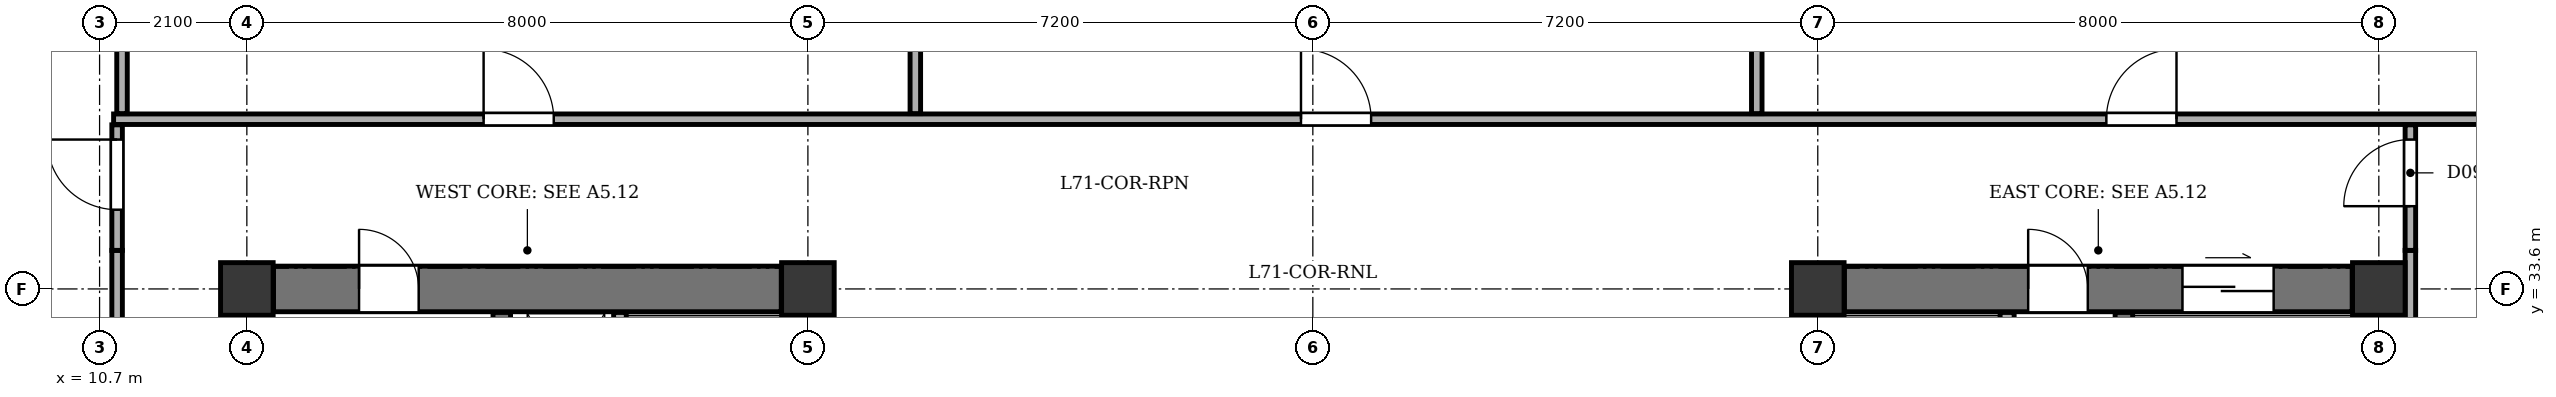
"""IFC4 building model, lengths in metres.
Left out: names, types, materials, properties, quantities, classifications, styles, units other than length and angle.
Written with IfcOpenShell. Run it as: python <this file> out.ifc"""

import sys

from ifc_helpers import new_model, si_unit, direction, frame, frame_2d, origin, origin_2d, place, context, subcontext, project, spatial, rectangle, extrude, element, fill, save


model = new_model("IFC4")
c1 = context("Model", 3, precision=1e-05, world=origin(), true_north=direction((0.0, 1.0)))
c2 = subcontext(c1, "Body", "Model", "MODEL_VIEW")
j1 = project(units=[si_unit("LENGTHUNIT", "METRE"), si_unit("PLANEANGLEUNIT", "RADIAN")], contexts=[c1])
p1 = place(None, origin())
s1 = spatial("IfcSite", under=j1, at=p1, CompositionType="ELEMENT")
p2 = place(p1, origin())
s2 = spatial("IfcBuilding", under=s1, at=p2, CompositionType="ELEMENT")
p3 = place(p2, frame((0.0, 0.0, 268.7)))
s3 = spatial("IfcBuildingStorey", under=s2, at=p3, CompositionType="ELEMENT", Elevation=268.7)
for number, where, z_axis, x_axis in (
    (1, (12.8, 33.6, 0.0), (0.0, 0.0, 1.0), (1.0, 0.0, 0.0)),
    (2, (20.8, 33.6, 0.0), (0.0, 0.0, 1.0), (1.0, 0.0, 0.0)),
    (3, (35.2, 33.6, 0.0), (0.0, 0.0, 1.0), (1.0, 0.0, 0.0)),
    (4, (43.2, 33.6, 0.0), (0.0, 0.0, 1.0), (1.0, 0.0, 0.0)),
):
    element("IfcColumn", number, at=place(p3, frame(where, z_axis=z_axis, x_axis=x_axis)), inside=s3, PredefinedType="COLUMN", context=c2, shape_type="SweptSolid", body=[
        extrude(rectangle(XDim=0.75, YDim=0.75, at=origin_2d()), origin(), (0.0, 0.0, 1.0), 3.4),
    ])
p4 = place(p3, frame((12.8, 21.18, 0.0), z_axis=(0.0, 0.0, 1.0), x_axis=(0.0, 1.0, 0.0)))
e5 = element("IfcWall", 5, at=p4, inside=s3, PredefinedType="SHEAR", context=c2, shape_type="SweptSolid", body=[
    extrude(rectangle(XDim=12.04, YDim=0.65, at=frame_2d((6.02, 0.0))), origin(), (0.0, 0.0, 1.0), 3.1),
])
p5 = place(p3, frame((13.18, 33.6, 0.0), z_axis=(0.0, 0.0, 1.0), x_axis=(1.0, 0.0, 0.0)))
e6 = element("IfcWall", 6, at=p5, inside=s3, PredefinedType="SHEAR", context=c2, shape_type="SweptSolid", body=[
    extrude(rectangle(XDim=7.24, YDim=0.65, at=frame_2d((3.62, 0.0))), origin(), (0.0, 0.0, 1.0), 3.1),
])
p6 = place(p5, frame((1.22, 0.0, 0.0)))
e7 = element("IfcOpeningElement", 7, at=p6, cuts=e6, PredefinedType="OPENING", context=c2, shape_type="SweptSolid", body=[
    extrude(rectangle(XDim=0.85, YDim=2.02, at=frame_2d((0.425, 1.01))), frame((0.0, 0.335, 0.0), z_axis=(0.0, -1.0, 0.0), x_axis=(1.0, 0.0, 0.0)), (0.0, 0.0, 1.0), 0.67),
])
p7 = place(p3, frame((20.8, 31.1, 0.0), z_axis=(0.0, 0.0, 1.0), x_axis=(0.0, 1.0, 0.0)))
e8 = element("IfcWall", 8, at=p7, inside=s3, PredefinedType="SHEAR", context=c2, shape_type="SweptSolid", body=[
    extrude(rectangle(XDim=2.12, YDim=0.65, at=frame_2d((1.06, 0.0))), origin(), (0.0, 0.0, 1.0), 3.1),
])
p8 = place(p7, frame((0.4, 0.0, 0.0)))
e9 = element("IfcOpeningElement", 9, at=p8, cuts=e8, PredefinedType="OPENING", context=c2, shape_type="SweptSolid", body=[
    extrude(rectangle(XDim=1.1, YDim=2.1, at=frame_2d((0.55, 1.05))), frame((0.0, 0.335, 0.0), z_axis=(0.0, -1.0, 0.0), x_axis=(1.0, 0.0, 0.0)), (0.0, 0.0, 1.0), 0.67),
])
p9 = place(p3, frame((16.435, 21.135, 0.0), z_axis=(0.0, 0.0, 1.0), x_axis=(0.0, 1.0, 0.0)))
e10 = element("IfcWall", 10, at=p9, inside=s3, PredefinedType="SHEAR", context=c2, shape_type="SweptSolid", body=[
    extrude(rectangle(XDim=12.13, YDim=0.25, at=frame_2d((6.065, 0.0))), origin(), (0.0, 0.0, 1.0), 3.1),
])
p10 = place(p9, frame((0.515, 0.0, 0.0)))
e11 = element("IfcOpeningElement", 11, at=p10, cuts=e10, PredefinedType="OPENING", context=c2, shape_type="SweptSolid", body=[
    extrude(rectangle(XDim=1.2, YDim=2.15, at=frame_2d((0.6, 1.075))), frame((0.0, 0.135, 0.0), z_axis=(0.0, -1.0, 0.0), x_axis=(1.0, 0.0, 0.0)), (0.0, 0.0, 1.0), 0.27),
])
p11 = place(p9, frame((2.665, 0.0, 0.0)))
e12 = element("IfcOpeningElement", 12, at=p11, cuts=e10, PredefinedType="OPENING", context=c2, shape_type="SweptSolid", body=[
    extrude(rectangle(XDim=1.15, YDim=2.15, at=frame_2d((0.575, 1.075))), frame((0.0, 0.135, 0.0), z_axis=(0.0, -1.0, 0.0), x_axis=(1.0, 0.0, 0.0)), (0.0, 0.0, 1.0), 0.27),
])
p12 = place(p3, frame((18.12, 31.17, 0.0), z_axis=(0.0, 0.0, 1.0), x_axis=(0.0, 1.0, 0.0)))
e13 = element("IfcWall", 13, at=p12, inside=s3, PredefinedType="PARTITIONING", context=c2, shape_type="SweptSolid", body=[
    extrude(rectangle(XDim=2.095, YDim=0.18, at=frame_2d((1.047, 0.0))), origin(), (0.0, 0.0, 1.0), 3.1),
])
p13 = place(p3, frame((43.2, 21.18, 0.0), z_axis=(0.0, 0.0, 1.0), x_axis=(0.0, 1.0, 0.0)))
e14 = element("IfcWall", 14, at=p13, inside=s3, PredefinedType="SHEAR", context=c2, shape_type="SweptSolid", body=[
    extrude(rectangle(XDim=12.04, YDim=0.65, at=frame_2d((6.02, 0.0))), origin(), (0.0, 0.0, 1.0), 3.1),
])
p14 = place(p3, frame((35.58, 33.6, 0.0), z_axis=(0.0, 0.0, 1.0), x_axis=(1.0, 0.0, 0.0)))
e15 = element("IfcWall", 15, at=p14, inside=s3, PredefinedType="SHEAR", context=c2, shape_type="SweptSolid", body=[
    extrude(rectangle(XDim=7.24, YDim=0.65, at=frame_2d((3.62, 0.0))), origin(), (0.0, 0.0, 1.0), 3.1),
])
p15 = place(p14, frame((4.82, 0.0, 0.0)))
e16 = element("IfcOpeningElement", 16, at=p15, cuts=e15, PredefinedType="OPENING", context=c2, shape_type="SweptSolid", body=[
    extrude(rectangle(XDim=1.3, YDim=2.15, at=frame_2d((0.65, 1.075))), frame((0.0, 0.335, 0.0), z_axis=(0.0, -1.0, 0.0), x_axis=(1.0, 0.0, 0.0)), (0.0, 0.0, 1.0), 0.67),
])
p16 = place(p14, frame((2.62, 0.0, 0.0)))
e17 = element("IfcOpeningElement", 17, at=p16, cuts=e15, PredefinedType="OPENING", context=c2, shape_type="SweptSolid", body=[
    extrude(rectangle(XDim=0.85, YDim=2.02, at=frame_2d((0.425, 1.01))), frame((0.0, 0.335, 0.0), z_axis=(0.0, -1.0, 0.0), x_axis=(1.0, 0.0, 0.0)), (0.0, 0.0, 1.0), 0.67),
])
p17 = place(p3, frame((35.2, 31.1, 0.0), z_axis=(0.0, 0.0, 1.0), x_axis=(0.0, 1.0, 0.0)))
e18 = element("IfcWall", 18, at=p17, inside=s3, PredefinedType="SHEAR", context=c2, shape_type="SweptSolid", body=[
    extrude(rectangle(XDim=2.12, YDim=0.65, at=frame_2d((1.06, 0.0))), origin(), (0.0, 0.0, 1.0), 3.1),
])
p18 = place(p17, frame((0.4, 0.0, 0.0)))
e19 = element("IfcOpeningElement", 19, at=p18, cuts=e18, PredefinedType="OPENING", context=c2, shape_type="SweptSolid", body=[
    extrude(rectangle(XDim=1.1, YDim=2.1, at=frame_2d((0.55, 1.05))), frame((0.0, 0.335, 0.0), z_axis=(0.0, -1.0, 0.0), x_axis=(1.0, 0.0, 0.0)), (0.0, 0.0, 1.0), 0.67),
])
p19 = place(p3, frame((39.565, 21.135, 0.0), z_axis=(0.0, 0.0, 1.0), x_axis=(0.0, 1.0, 0.0)))
e20 = element("IfcWall", 20, at=p19, inside=s3, PredefinedType="SHEAR", context=c2, shape_type="SweptSolid", body=[
    extrude(rectangle(XDim=12.13, YDim=0.25, at=frame_2d((6.065, 0.0))), origin(), (0.0, 0.0, 1.0), 3.1),
])
p20 = place(p19, frame((0.515, 0.0, 0.0)))
e21 = element("IfcOpeningElement", 21, at=p20, cuts=e20, PredefinedType="OPENING", context=c2, shape_type="SweptSolid", body=[
    extrude(rectangle(XDim=1.2, YDim=2.15, at=frame_2d((0.6, 1.075))), frame((0.0, 0.135, 0.0), z_axis=(0.0, -1.0, 0.0), x_axis=(1.0, 0.0, 0.0)), (0.0, 0.0, 1.0), 0.27),
])
p21 = place(p19, frame((2.665, 0.0, 0.0)))
e22 = element("IfcOpeningElement", 22, at=p21, cuts=e20, PredefinedType="OPENING", context=c2, shape_type="SweptSolid", body=[
    extrude(rectangle(XDim=1.15, YDim=2.15, at=frame_2d((0.575, 1.075))), frame((0.0, 0.135, 0.0), z_axis=(0.0, -1.0, 0.0), x_axis=(1.0, 0.0, 0.0)), (0.0, 0.0, 1.0), 0.27),
])
p22 = place(p3, frame((37.9, 25.27, 0.0), z_axis=(0.0, 0.0, 1.0), x_axis=(0.0, 1.0, 0.0)))
e23 = element("IfcWall", 23, at=p22, inside=s3, PredefinedType="SOLIDWALL", context=c2, shape_type="SweptSolid", body=[
    extrude(rectangle(XDim=7.995, YDim=0.2, at=frame_2d((3.998, 0.0))), origin(), (0.0, 0.0, 1.0), 3.1),
])
p23 = place(p3, frame((10.9, 36.02, 0.0), z_axis=(0.0, 0.0, 1.0), x_axis=(1.0, 0.0, 0.0)))
e24 = element("IfcWall", 24, at=p23, inside=s3, PredefinedType="PARTITIONING", context=c2, shape_type="SweptSolid", body=[
    extrude(rectangle(XDim=34.52, YDim=0.15, at=frame_2d((17.26, 0.0))), origin(), (0.0, 0.0, 1.0), 3.1),
])
p24 = place(p23, frame((5.276, 0.0, 0.0)))
e25 = element("IfcOpeningElement", 25, at=p24, cuts=e24, PredefinedType="OPENING", context=c2, shape_type="SweptSolid", body=[
    extrude(rectangle(XDim=1.0, YDim=2.1, at=frame_2d((0.5, 1.05))), frame((0.0, 0.085, 0.0), z_axis=(0.0, -1.0, 0.0), x_axis=(1.0, 0.0, 0.0)), (0.0, 0.0, 1.0), 0.17),
])
p25 = place(p23, frame((16.931, 0.0, 0.0)))
e26 = element("IfcOpeningElement", 26, at=p25, cuts=e24, PredefinedType="OPENING", context=c2, shape_type="SweptSolid", body=[
    extrude(rectangle(XDim=1.0, YDim=2.1, at=frame_2d((0.5, 1.05))), frame((0.0, 0.085, 0.0), z_axis=(0.0, -1.0, 0.0), x_axis=(1.0, 0.0, 0.0)), (0.0, 0.0, 1.0), 0.17),
])
p26 = place(p23, frame((28.415, 0.0, 0.0)))
e27 = element("IfcOpeningElement", 27, at=p26, cuts=e24, PredefinedType="OPENING", context=c2, shape_type="SweptSolid", body=[
    extrude(rectangle(XDim=1.0, YDim=2.1, at=frame_2d((0.5, 1.05))), frame((0.0, 0.085, 0.0), z_axis=(0.0, -1.0, 0.0), x_axis=(1.0, 0.0, 0.0)), (0.0, 0.0, 1.0), 0.17),
])
p27 = place(p3, frame((11.02, 36.1, 0.0), z_axis=(0.0, 0.0, 1.0), x_axis=(0.0, 1.0, 0.0)))
e28 = element("IfcWall", 28, at=p27, inside=s3, PredefinedType="PARTITIONING", context=c2, shape_type="SweptSolid", body=[
    extrude(rectangle(XDim=8.655, YDim=0.15, at=frame_2d((4.327, 0.0))), origin(), (0.0, 0.0, 1.0), 3.1),
])
p28 = place(p3, frame((22.332, 36.1, 0.0), z_axis=(0.0, 0.0, 1.0), x_axis=(0.0, 1.0, 0.0)))
e29 = element("IfcWall", 29, at=p28, inside=s3, PredefinedType="PARTITIONING", context=c2, shape_type="SweptSolid", body=[
    extrude(rectangle(XDim=8.655, YDim=0.15, at=frame_2d((4.327, 0.0))), origin(), (0.0, 0.0, 1.0), 2.725),
])
p29 = place(p3, frame((34.33, 36.1, 0.0), z_axis=(0.0, 0.0, 1.0), x_axis=(0.0, 1.0, 0.0)))
e30 = element("IfcWall", 30, at=p29, inside=s3, PredefinedType="PARTITIONING", context=c2, shape_type="SweptSolid", body=[
    extrude(rectangle(XDim=8.655, YDim=0.15, at=frame_2d((4.327, 0.0))), origin(), (0.0, 0.0, 1.0), 3.1),
])
p30 = place(p3, frame((10.95, 20.25, 0.0), z_axis=(0.0, 0.0, 1.0), x_axis=(0.0, 1.0, 0.0)))
e31 = element("IfcWall", 31, at=p30, inside=s3, PredefinedType="PARTITIONING", context=c2, shape_type="SweptSolid", body=[
    extrude(rectangle(XDim=13.9, YDim=0.15, at=frame_2d((6.95, 0.0))), origin(), (0.0, 0.0, 1.0), 3.1),
])
p31 = place(p3, frame((10.95, 34.15, 0.0), z_axis=(0.0, 0.0, 1.0), x_axis=(0.0, 1.0, 0.0)))
e32 = element("IfcWall", 32, at=p31, inside=s3, PredefinedType="PARTITIONING", context=c2, shape_type="SweptSolid", body=[
    extrude(rectangle(XDim=1.79, YDim=0.15, at=frame_2d((0.895, 0.0))), origin(), (0.0, 0.0, 1.0), 3.1),
])
p32 = place(p31, frame((0.58, 0.0, 0.0)))
e33 = element("IfcOpeningElement", 33, at=p32, cuts=e32, PredefinedType="OPENING", context=c2, shape_type="SweptSolid", body=[
    extrude(rectangle(XDim=1.0, YDim=2.1, at=frame_2d((0.5, 1.05))), frame((0.0, 0.085, 0.0), z_axis=(0.0, -1.0, 0.0), x_axis=(1.0, 0.0, 0.0)), (0.0, 0.0, 1.0), 0.17),
])
p33 = place(p3, frame((43.65, 20.88, 0.0), z_axis=(0.0, 0.0, 1.0), x_axis=(0.0, 1.0, 0.0)))
e34 = element("IfcWall", 34, at=p33, inside=s3, PredefinedType="PARTITIONING", context=c2, shape_type="SweptSolid", body=[
    extrude(rectangle(XDim=13.27, YDim=0.15, at=frame_2d((6.635, 0.0))), origin(), (0.0, 0.0, 1.0), 3.1),
])
p34 = place(p3, frame((43.65, 34.15, 0.0), z_axis=(0.0, 0.0, 1.0), x_axis=(0.0, 1.0, 0.0)))
e35 = element("IfcWall", 35, at=p34, inside=s3, PredefinedType="PARTITIONING", context=c2, shape_type="SweptSolid", body=[
    extrude(rectangle(XDim=1.79, YDim=0.15, at=frame_2d((0.895, 0.0))), origin(), (0.0, 0.0, 1.0), 3.1),
])
p35 = place(p34, frame((0.63, 0.0, 0.0)))
e36 = element("IfcOpeningElement", 36, at=p35, cuts=e35, PredefinedType="OPENING", context=c2, shape_type="SweptSolid", body=[
    extrude(rectangle(XDim=0.95, YDim=2.1, at=frame_2d((0.475, 1.05))), frame((0.0, 0.085, 0.0), z_axis=(0.0, -1.0, 0.0), x_axis=(1.0, 0.0, 0.0)), (0.0, 0.0, 1.0), 0.17),
])
p36 = place(p6, origin())
e37 = element("IfcDoor", 37, at=p36, inside=s3, OperationType="SINGLE_SWING_LEFT", PredefinedType="DOOR", context=c2, shape_type="SweptSolid", body=[
    extrude(rectangle(XDim=0.85, YDim=2.02, at=frame_2d((0.425, 1.01))), frame((0.0, 0.025, 0.0), z_axis=(0.0, -1.0, 0.0), x_axis=(1.0, 0.0, 0.0)), (0.0, 0.0, 1.0), 0.05),
])
fill(e7, e37)
p37 = place(p15, origin())
e38 = element("IfcDoor", 38, at=p37, inside=s3, OperationType="DOUBLE_DOOR_SLIDING", PredefinedType="DOOR", context=c2, shape_type="SweptSolid", body=[
    extrude(rectangle(XDim=1.3, YDim=2.15, at=frame_2d((0.65, 1.075))), frame((0.0, 0.025, 0.0), z_axis=(0.0, -1.0, 0.0), x_axis=(1.0, 0.0, 0.0)), (0.0, 0.0, 1.0), 0.05),
])
fill(e16, e38)
p38 = place(p16, origin())
e39 = element("IfcDoor", 39, at=p38, inside=s3, OperationType="SINGLE_SWING_LEFT", PredefinedType="DOOR", context=c2, shape_type="SweptSolid", body=[
    extrude(rectangle(XDim=0.85, YDim=2.02, at=frame_2d((0.425, 1.01))), frame((0.0, 0.025, 0.0), z_axis=(0.0, -1.0, 0.0), x_axis=(1.0, 0.0, 0.0)), (0.0, 0.0, 1.0), 0.05),
])
fill(e17, e39)
p39 = place(p24, origin())
e40 = element("IfcDoor", 40, at=p39, inside=s3, OperationType="SINGLE_SWING_LEFT", PredefinedType="DOOR", context=c2, shape_type="SweptSolid", body=[
    extrude(rectangle(XDim=1.0, YDim=2.1, at=frame_2d((0.5, 1.05))), frame((0.0, 0.025, 0.0), z_axis=(0.0, -1.0, 0.0), x_axis=(1.0, 0.0, 0.0)), (0.0, 0.0, 1.0), 0.05),
])
fill(e25, e40)
p40 = place(p25, origin())
e41 = element("IfcDoor", 41, at=p40, inside=s3, OperationType="SINGLE_SWING_LEFT", PredefinedType="DOOR", context=c2, shape_type="SweptSolid", body=[
    extrude(rectangle(XDim=1.0, YDim=2.1, at=frame_2d((0.5, 1.05))), frame((0.0, 0.025, 0.0), z_axis=(0.0, -1.0, 0.0), x_axis=(1.0, 0.0, 0.0)), (0.0, 0.0, 1.0), 0.05),
])
fill(e26, e41)
p41 = place(p26, origin())
e42 = element("IfcDoor", 42, at=p41, inside=s3, OperationType="SINGLE_SWING_RIGHT", PredefinedType="DOOR", context=c2, shape_type="SweptSolid", body=[
    extrude(rectangle(XDim=1.0, YDim=2.1, at=frame_2d((0.5, 1.05))), frame((0.0, 0.025, 0.0), z_axis=(0.0, -1.0, 0.0), x_axis=(1.0, 0.0, 0.0)), (0.0, 0.0, 1.0), 0.05),
])
fill(e27, e42)
p42 = place(p32, origin())
e43 = element("IfcDoor", 43, at=p42, inside=s3, OperationType="SINGLE_SWING_RIGHT", PredefinedType="DOOR", context=c2, shape_type="SweptSolid", body=[
    extrude(rectangle(XDim=1.0, YDim=2.1, at=frame_2d((0.5, 1.05))), frame((0.0, 0.025, 0.0), z_axis=(0.0, -1.0, 0.0), x_axis=(1.0, 0.0, 0.0)), (0.0, 0.0, 1.0), 0.05),
])
fill(e33, e43)
p43 = place(p35, origin())
e44 = element("IfcDoor", 44, at=p43, inside=s3, OperationType="SINGLE_SWING_LEFT", PredefinedType="DOOR", context=c2, shape_type="SweptSolid", body=[
    extrude(rectangle(XDim=0.95, YDim=2.1, at=frame_2d((0.475, 1.05))), frame((0.0, 0.025, 0.0), z_axis=(0.0, -1.0, 0.0), x_axis=(1.0, 0.0, 0.0)), (0.0, 0.0, 1.0), 0.05),
])
fill(e36, e44)
save(model, sys.argv[1])
